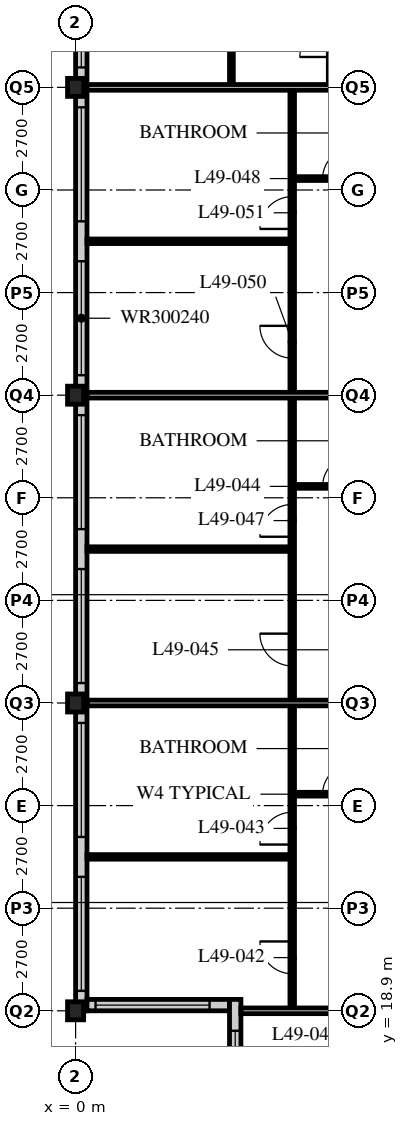
"""IFC4 building model, lengths in metres.
Left out: names, types, materials, properties, quantities, classifications, styles, units other than length and angle.
Written with IfcOpenShell. Run it as: python <this file> out.ifc"""

import sys

from ifc_helpers import new_model, si_unit, direction, frame, frame_2d, origin, origin_2d, place, context, subcontext, project, spatial, rectangle, i_section, extrude, element, fill, save


model = new_model("IFC4")
c1 = context("Model", 3, precision=1e-05, world=origin(), true_north=direction((0.0, 1.0)))
c2 = subcontext(c1, "Body", "Model", "MODEL_VIEW")
j1 = project(units=[si_unit("LENGTHUNIT", "METRE"), si_unit("PLANEANGLEUNIT", "RADIAN")], contexts=[c1])
p1 = place(None, origin())
s1 = spatial("IfcSite", under=j1, at=p1, CompositionType="ELEMENT")
p2 = place(p1, origin())
s2 = spatial("IfcBuilding", under=s1, at=p2, CompositionType="ELEMENT")
p3 = place(p2, frame((0.0, 0.0, 192.0)))
s3 = spatial("IfcBuildingStorey", under=s2, at=p3, CompositionType="ELEMENT", Elevation=192.0)
for number, where, z_axis, x_axis in (
    (1, (0.0, 18.9, 0.0), (0.0, 0.0, 1.0), (1.0, 0.0, 0.0)),
    (2, (0.0, 27.0, 0.0), (0.0, 0.0, 1.0), (1.0, 0.0, 0.0)),
    (3, (0.0, 35.1, 0.0), (0.0, 0.0, 1.0), (1.0, 0.0, 0.0)),
    (4, (0.0, 43.2, 0.0), (0.0, 0.0, 1.0), (1.0, 0.0, 0.0)),
):
    element("IfcColumn", number, at=place(p3, frame(where, z_axis=z_axis, x_axis=x_axis)), inside=s3, PredefinedType="COLUMN", context=c2, shape_type="SweptSolid", body=[
        extrude(i_section(OverallWidth=0.424, OverallDepth=0.475, WebThickness=0.048, FlangeThickness=0.077, FilletRadius=0.015, at=origin_2d()), origin(), (0.0, 0.0, 1.0), 3.6),
    ])
p4 = place(p3, frame((0.15, 51.0, 0.0), z_axis=(0.0, 0.0, 1.0), x_axis=(0.0, -1.0, 0.0)))
e5 = element("IfcWall", 5, at=p4, inside=s3, PredefinedType="SOLIDWALL", context=c2, shape_type="SweptSolid", body=[
    extrude(rectangle(XDim=32.1, YDim=0.3, at=frame_2d((16.05, 0.0))), origin(), (0.0, 0.0, 1.0), 3.39),
])
p5 = place(p4, frame((0.225, 0.0, 0.6)))
e6 = element("IfcOpeningElement", 6, at=p5, cuts=e5, PredefinedType="OPENING", context=c2, shape_type="SweptSolid", body=[
    extrude(rectangle(XDim=3.0, YDim=2.4, at=frame_2d((1.5, 1.2))), frame((0.0, 0.16, 0.0), z_axis=(0.0, -1.0, 0.0), x_axis=(1.0, 0.0, 0.0)), (0.0, 0.0, 1.0), 0.32),
])
p6 = place(p4, frame((4.275, 0.0, 0.6)))
e7 = element("IfcOpeningElement", 7, at=p6, cuts=e5, PredefinedType="OPENING", context=c2, shape_type="SweptSolid", body=[
    extrude(rectangle(XDim=3.0, YDim=2.4, at=frame_2d((1.5, 1.2))), frame((0.0, 0.16, 0.0), z_axis=(0.0, -1.0, 0.0), x_axis=(1.0, 0.0, 0.0)), (0.0, 0.0, 1.0), 0.32),
])
p7 = place(p4, frame((8.325, 0.0, 0.6)))
e8 = element("IfcOpeningElement", 8, at=p7, cuts=e5, PredefinedType="OPENING", context=c2, shape_type="SweptSolid", body=[
    extrude(rectangle(XDim=3.0, YDim=2.4, at=frame_2d((1.5, 1.2))), frame((0.0, 0.16, 0.0), z_axis=(0.0, -1.0, 0.0), x_axis=(1.0, 0.0, 0.0)), (0.0, 0.0, 1.0), 0.32),
])
p8 = place(p4, frame((12.375, 0.0, 0.6)))
e9 = element("IfcOpeningElement", 9, at=p8, cuts=e5, PredefinedType="OPENING", context=c2, shape_type="SweptSolid", body=[
    extrude(rectangle(XDim=3.0, YDim=2.4, at=frame_2d((1.5, 1.2))), frame((0.0, 0.16, 0.0), z_axis=(0.0, -1.0, 0.0), x_axis=(1.0, 0.0, 0.0)), (0.0, 0.0, 1.0), 0.32),
])
p9 = place(p4, frame((16.425, 0.0, 0.6)))
e10 = element("IfcOpeningElement", 10, at=p9, cuts=e5, PredefinedType="OPENING", context=c2, shape_type="SweptSolid", body=[
    extrude(rectangle(XDim=3.0, YDim=2.4, at=frame_2d((1.5, 1.2))), frame((0.0, 0.16, 0.0), z_axis=(0.0, -1.0, 0.0), x_axis=(1.0, 0.0, 0.0)), (0.0, 0.0, 1.0), 0.32),
])
p10 = place(p4, frame((20.475, 0.0, 0.6)))
e11 = element("IfcOpeningElement", 11, at=p10, cuts=e5, PredefinedType="OPENING", context=c2, shape_type="SweptSolid", body=[
    extrude(rectangle(XDim=3.0, YDim=2.4, at=frame_2d((1.5, 1.2))), frame((0.0, 0.16, 0.0), z_axis=(0.0, -1.0, 0.0), x_axis=(1.0, 0.0, 0.0)), (0.0, 0.0, 1.0), 0.32),
])
p11 = place(p4, frame((24.525, 0.0, 0.6)))
e12 = element("IfcOpeningElement", 12, at=p11, cuts=e5, PredefinedType="OPENING", context=c2, shape_type="SweptSolid", body=[
    extrude(rectangle(XDim=3.0, YDim=2.4, at=frame_2d((1.5, 1.2))), frame((0.0, 0.16, 0.0), z_axis=(0.0, -1.0, 0.0), x_axis=(1.0, 0.0, 0.0)), (0.0, 0.0, 1.0), 0.32),
])
p12 = place(p4, frame((28.575, 0.0, 0.6)))
e13 = element("IfcOpeningElement", 13, at=p12, cuts=e5, PredefinedType="OPENING", context=c2, shape_type="SweptSolid", body=[
    extrude(rectangle(XDim=3.0, YDim=2.4, at=frame_2d((1.5, 1.2))), frame((0.0, 0.16, 0.0), z_axis=(0.0, -1.0, 0.0), x_axis=(1.0, 0.0, 0.0)), (0.0, 0.0, 1.0), 0.32),
])
p13 = place(p3, frame((0.3, 19.05, 0.0), z_axis=(0.0, 0.0, 1.0), x_axis=(1.0, 0.0, 0.0)))
e14 = element("IfcWall", 14, at=p13, inside=s3, PredefinedType="SOLIDWALL", context=c2, shape_type="SweptSolid", body=[
    extrude(rectangle(XDim=3.75, YDim=0.3, at=frame_2d((1.875, 0.0))), origin(), (0.0, 0.0, 1.0), 3.39),
])
p14 = place(p13, frame((0.225, 0.0, 0.6)))
e15 = element("IfcOpeningElement", 15, at=p14, cuts=e14, PredefinedType="OPENING", context=c2, shape_type="SweptSolid", body=[
    extrude(rectangle(XDim=3.0, YDim=2.0, at=frame_2d((1.5, 1.0))), frame((0.0, 0.16, 0.0), z_axis=(0.0, -1.0, 0.0), x_axis=(1.0, 0.0, 0.0)), (0.0, 0.0, 1.0), 0.32),
])
p15 = place(p3, frame((4.2, 19.2, 0.0), z_axis=(0.0, 0.0, 1.0), x_axis=(0.0, -1.0, 0.0)))
e16 = element("IfcWall", 16, at=p15, inside=s3, PredefinedType="SOLIDWALL", context=c2, shape_type="SweptSolid", body=[
    extrude(rectangle(XDim=4.35, YDim=0.3, at=frame_2d((2.175, 0.0))), origin(), (0.0, 0.0, 1.0), 3.39),
])
p16 = place(p15, frame((0.825, 0.0, 0.6)))
e17 = element("IfcOpeningElement", 17, at=p16, cuts=e16, PredefinedType="OPENING", context=c2, shape_type="SweptSolid", body=[
    extrude(rectangle(XDim=3.0, YDim=2.0, at=frame_2d((1.5, 1.0))), frame((0.0, 0.16, 0.0), z_axis=(0.0, -1.0, 0.0), x_axis=(1.0, 0.0, 0.0)), (0.0, 0.0, 1.0), 0.32),
])
p17 = place(p3, frame((5.7, 18.9, 0.0), z_axis=(0.0, 0.0, 1.0), x_axis=(0.0, 1.0, 0.0)))
e18 = element("IfcWall", 18, at=p17, inside=s3, PredefinedType="PARTITIONING", context=c2, shape_type="SweptSolid", body=[
    extrude(rectangle(XDim=24.3, YDim=0.12, at=frame_2d((12.15, 0.0))), origin(), (0.0, 0.0, 1.0), 3.39),
])
p18 = place(p17, frame((0.975, 0.0, 0.0)))
e19 = element("IfcOpeningElement", 19, at=p18, cuts=e18, PredefinedType="OPENING", context=c2, shape_type="SweptSolid", body=[
    extrude(rectangle(XDim=0.85, YDim=2.1, at=frame_2d((0.425, 1.05))), frame((0.0, 0.07, 0.0), z_axis=(0.0, -1.0, 0.0), x_axis=(1.0, 0.0, 0.0)), (0.0, 0.0, 1.0), 0.14),
])
p19 = place(p17, frame((4.375, 0.0, 0.0)))
e20 = element("IfcOpeningElement", 20, at=p19, cuts=e18, PredefinedType="OPENING", context=c2, shape_type="SweptSolid", body=[
    extrude(rectangle(XDim=0.85, YDim=2.1, at=frame_2d((0.425, 1.05))), frame((0.0, 0.07, 0.0), z_axis=(0.0, -1.0, 0.0), x_axis=(1.0, 0.0, 0.0)), (0.0, 0.0, 1.0), 0.14),
])
p20 = place(p17, frame((9.075, 0.0, 0.0)))
e21 = element("IfcOpeningElement", 21, at=p20, cuts=e18, PredefinedType="OPENING", context=c2, shape_type="SweptSolid", body=[
    extrude(rectangle(XDim=0.85, YDim=2.1, at=frame_2d((0.425, 1.05))), frame((0.0, 0.07, 0.0), z_axis=(0.0, -1.0, 0.0), x_axis=(1.0, 0.0, 0.0)), (0.0, 0.0, 1.0), 0.14),
])
p21 = place(p17, frame((12.475, 0.0, 0.0)))
e22 = element("IfcOpeningElement", 22, at=p21, cuts=e18, PredefinedType="OPENING", context=c2, shape_type="SweptSolid", body=[
    extrude(rectangle(XDim=0.85, YDim=2.1, at=frame_2d((0.425, 1.05))), frame((0.0, 0.07, 0.0), z_axis=(0.0, -1.0, 0.0), x_axis=(1.0, 0.0, 0.0)), (0.0, 0.0, 1.0), 0.14),
])
p22 = place(p17, frame((17.175, 0.0, 0.0)))
e23 = element("IfcOpeningElement", 23, at=p22, cuts=e18, PredefinedType="OPENING", context=c2, shape_type="SweptSolid", body=[
    extrude(rectangle(XDim=0.85, YDim=2.1, at=frame_2d((0.425, 1.05))), frame((0.0, 0.07, 0.0), z_axis=(0.0, -1.0, 0.0), x_axis=(1.0, 0.0, 0.0)), (0.0, 0.0, 1.0), 0.14),
])
p23 = place(p17, frame((20.575, 0.0, 0.0)))
e24 = element("IfcOpeningElement", 24, at=p23, cuts=e18, PredefinedType="OPENING", context=c2, shape_type="SweptSolid", body=[
    extrude(rectangle(XDim=0.85, YDim=2.1, at=frame_2d((0.425, 1.05))), frame((0.0, 0.07, 0.0), z_axis=(0.0, -1.0, 0.0), x_axis=(1.0, 0.0, 0.0)), (0.0, 0.0, 1.0), 0.14),
])
p24 = place(p3, frame((8.1, 24.6, 0.0), z_axis=(0.0, 0.0, 1.0), x_axis=(-1.0, 0.0, 0.0)))
e25 = element("IfcWall", 25, at=p24, inside=s3, PredefinedType="PARTITIONING", context=c2, shape_type="SweptSolid", body=[
    extrude(rectangle(XDim=2.4, YDim=0.1, at=frame_2d((1.2, 0.0))), origin(), (0.0, 0.0, 1.0), 3.39),
])
p25 = place(p24, frame((0.8, 0.0, 0.0)))
e26 = element("IfcOpeningElement", 26, at=p25, cuts=e25, PredefinedType="OPENING", context=c2, shape_type="SweptSolid", body=[
    extrude(rectangle(XDim=0.8, YDim=2.1, at=frame_2d((0.4, 1.05))), frame((0.0, 0.06, 0.0), z_axis=(0.0, -1.0, 0.0), x_axis=(1.0, 0.0, 0.0)), (0.0, 0.0, 1.0), 0.12),
])
p26 = place(p3, frame((5.7, 22.95, 0.0), z_axis=(0.0, 0.0, 1.0), x_axis=(-1.0, 0.0, 0.0)))
e27 = element("IfcWall", 27, at=p26, inside=s3, PredefinedType="PARTITIONING", context=c2, shape_type="SweptSolid", body=[
    extrude(rectangle(XDim=5.4, YDim=0.12, at=frame_2d((2.7, 0.0))), origin(), (0.0, 0.0, 1.0), 3.39),
])
p27 = place(p3, frame((8.1, 27.0, 0.0), z_axis=(0.0, 0.0, 1.0), x_axis=(-1.0, 0.0, 0.0)))
e28 = element("IfcWall", 28, at=p27, inside=s3, PredefinedType="PARTITIONING", context=c2, shape_type="SweptSolid", body=[
    extrude(rectangle(XDim=7.8, YDim=0.15, at=frame_2d((3.9, 0.0))), origin(), (0.0, 0.0, 1.0), 2.778),
])
p28 = place(p3, frame((8.1, 32.7, 0.0), z_axis=(0.0, 0.0, 1.0), x_axis=(-1.0, 0.0, 0.0)))
e29 = element("IfcWall", 29, at=p28, inside=s3, PredefinedType="PARTITIONING", context=c2, shape_type="SweptSolid", body=[
    extrude(rectangle(XDim=2.4, YDim=0.1, at=frame_2d((1.2, 0.0))), origin(), (0.0, 0.0, 1.0), 3.39),
])
p29 = place(p28, frame((0.8, 0.0, 0.0)))
e30 = element("IfcOpeningElement", 30, at=p29, cuts=e29, PredefinedType="OPENING", context=c2, shape_type="SweptSolid", body=[
    extrude(rectangle(XDim=0.8, YDim=2.1, at=frame_2d((0.4, 1.05))), frame((0.0, 0.06, 0.0), z_axis=(0.0, -1.0, 0.0), x_axis=(1.0, 0.0, 0.0)), (0.0, 0.0, 1.0), 0.12),
])
p30 = place(p3, frame((5.7, 31.05, 0.0), z_axis=(0.0, 0.0, 1.0), x_axis=(-1.0, 0.0, 0.0)))
e31 = element("IfcWall", 31, at=p30, inside=s3, PredefinedType="PARTITIONING", context=c2, shape_type="SweptSolid", body=[
    extrude(rectangle(XDim=5.4, YDim=0.12, at=frame_2d((2.7, 0.0))), origin(), (0.0, 0.0, 1.0), 3.39),
])
p31 = place(p3, frame((8.1, 35.1, 0.0), z_axis=(0.0, 0.0, 1.0), x_axis=(-1.0, 0.0, 0.0)))
e32 = element("IfcWall", 32, at=p31, inside=s3, PredefinedType="PARTITIONING", context=c2, shape_type="SweptSolid", body=[
    extrude(rectangle(XDim=7.8, YDim=0.15, at=frame_2d((3.9, 0.0))), origin(), (0.0, 0.0, 1.0), 2.778),
])
p32 = place(p3, frame((8.1, 40.8, 0.0), z_axis=(0.0, 0.0, 1.0), x_axis=(-1.0, 0.0, 0.0)))
e33 = element("IfcWall", 33, at=p32, inside=s3, PredefinedType="PARTITIONING", context=c2, shape_type="SweptSolid", body=[
    extrude(rectangle(XDim=2.4, YDim=0.1, at=frame_2d((1.2, 0.0))), origin(), (0.0, 0.0, 1.0), 3.39),
])
p33 = place(p32, frame((0.8, 0.0, 0.0)))
e34 = element("IfcOpeningElement", 34, at=p33, cuts=e33, PredefinedType="OPENING", context=c2, shape_type="SweptSolid", body=[
    extrude(rectangle(XDim=0.8, YDim=2.1, at=frame_2d((0.4, 1.05))), frame((0.0, 0.06, 0.0), z_axis=(0.0, -1.0, 0.0), x_axis=(1.0, 0.0, 0.0)), (0.0, 0.0, 1.0), 0.12),
])
p34 = place(p3, frame((5.7, 39.15, 0.0), z_axis=(0.0, 0.0, 1.0), x_axis=(-1.0, 0.0, 0.0)))
e35 = element("IfcWall", 35, at=p34, inside=s3, PredefinedType="PARTITIONING", context=c2, shape_type="SweptSolid", body=[
    extrude(rectangle(XDim=5.4, YDim=0.12, at=frame_2d((2.7, 0.0))), origin(), (0.0, 0.0, 1.0), 3.39),
])
p35 = place(p3, frame((4.35, 18.9, 0.0), z_axis=(0.0, 0.0, 1.0), x_axis=(1.0, 0.0, 0.0)))
e36 = element("IfcWall", 36, at=p35, inside=s3, PredefinedType="PARTITIONING", context=c2, shape_type="SweptSolid", body=[
    extrude(rectangle(XDim=3.75, YDim=0.15, at=frame_2d((1.875, 0.0))), origin(), (0.0, 0.0, 1.0), 2.778),
])
p36 = place(p3, frame((4.1, 43.2, 0.0), z_axis=(0.0, 0.0, 1.0), x_axis=(0.0, 1.0, 0.0)))
e37 = element("IfcWall", 37, at=p36, inside=s3, PredefinedType="PARTITIONING", context=c2, shape_type="SweptSolid", body=[
    extrude(rectangle(XDim=2.4, YDim=0.1, at=frame_2d((1.2, 0.0))), origin(), (0.0, 0.0, 1.0), 3.39),
])
p37 = place(p3, frame((0.3, 43.2, 0.0), z_axis=(0.0, 0.0, 1.0), x_axis=(1.0, 0.0, 0.0)))
e38 = element("IfcWall", 38, at=p37, inside=s3, PredefinedType="PARTITIONING", context=c2, shape_type="SweptSolid", body=[
    extrude(rectangle(XDim=7.8, YDim=0.15, at=frame_2d((3.9, 0.0))), origin(), (0.0, 0.0, 1.0), 2.778),
])
p38 = place(p6, origin())
e39 = element("IfcWindow", 39, at=p38, inside=s3, PartitioningType="SINGLE_PANEL", PredefinedType="WINDOW", context=c2, shape_type="SweptSolid", body=[
    extrude(rectangle(XDim=3.0, YDim=2.4, at=frame_2d((1.5, 1.2))), frame((0.0, 0.03, 0.0), z_axis=(0.0, -1.0, 0.0), x_axis=(1.0, 0.0, 0.0)), (0.0, 0.0, 1.0), 0.06),
])
fill(e7, e39)
p39 = place(p7, origin())
e40 = element("IfcWindow", 40, at=p39, inside=s3, PartitioningType="SINGLE_PANEL", PredefinedType="WINDOW", context=c2, shape_type="SweptSolid", body=[
    extrude(rectangle(XDim=3.0, YDim=2.4, at=frame_2d((1.5, 1.2))), frame((0.0, 0.03, 0.0), z_axis=(0.0, -1.0, 0.0), x_axis=(1.0, 0.0, 0.0)), (0.0, 0.0, 1.0), 0.06),
])
fill(e8, e40)
p40 = place(p8, origin())
e41 = element("IfcWindow", 41, at=p40, inside=s3, PartitioningType="SINGLE_PANEL", PredefinedType="WINDOW", context=c2, shape_type="SweptSolid", body=[
    extrude(rectangle(XDim=3.0, YDim=2.4, at=frame_2d((1.5, 1.2))), frame((0.0, 0.03, 0.0), z_axis=(0.0, -1.0, 0.0), x_axis=(1.0, 0.0, 0.0)), (0.0, 0.0, 1.0), 0.06),
])
fill(e9, e41)
p41 = place(p9, origin())
e42 = element("IfcWindow", 42, at=p41, inside=s3, PartitioningType="SINGLE_PANEL", PredefinedType="WINDOW", context=c2, shape_type="SweptSolid", body=[
    extrude(rectangle(XDim=3.0, YDim=2.4, at=frame_2d((1.5, 1.2))), frame((0.0, 0.03, 0.0), z_axis=(0.0, -1.0, 0.0), x_axis=(1.0, 0.0, 0.0)), (0.0, 0.0, 1.0), 0.06),
])
fill(e10, e42)
p42 = place(p10, origin())
e43 = element("IfcWindow", 43, at=p42, inside=s3, PartitioningType="SINGLE_PANEL", PredefinedType="WINDOW", context=c2, shape_type="SweptSolid", body=[
    extrude(rectangle(XDim=3.0, YDim=2.4, at=frame_2d((1.5, 1.2))), frame((0.0, 0.03, 0.0), z_axis=(0.0, -1.0, 0.0), x_axis=(1.0, 0.0, 0.0)), (0.0, 0.0, 1.0), 0.06),
])
fill(e11, e43)
p43 = place(p11, origin())
e44 = element("IfcWindow", 44, at=p43, inside=s3, PartitioningType="SINGLE_PANEL", PredefinedType="WINDOW", context=c2, shape_type="SweptSolid", body=[
    extrude(rectangle(XDim=3.0, YDim=2.4, at=frame_2d((1.5, 1.2))), frame((0.0, 0.03, 0.0), z_axis=(0.0, -1.0, 0.0), x_axis=(1.0, 0.0, 0.0)), (0.0, 0.0, 1.0), 0.06),
])
fill(e12, e44)
p44 = place(p12, origin())
e45 = element("IfcWindow", 45, at=p44, inside=s3, PartitioningType="SINGLE_PANEL", PredefinedType="WINDOW", context=c2, shape_type="SweptSolid", body=[
    extrude(rectangle(XDim=3.0, YDim=2.4, at=frame_2d((1.5, 1.2))), frame((0.0, 0.03, 0.0), z_axis=(0.0, -1.0, 0.0), x_axis=(1.0, 0.0, 0.0)), (0.0, 0.0, 1.0), 0.06),
])
fill(e13, e45)
p45 = place(p14, origin())
e46 = element("IfcWindow", 46, at=p45, inside=s3, PartitioningType="SINGLE_PANEL", PredefinedType="WINDOW", context=c2, shape_type="SweptSolid", body=[
    extrude(rectangle(XDim=3.0, YDim=2.0, at=frame_2d((1.5, 1.0))), frame((0.0, 0.03, 0.0), z_axis=(0.0, -1.0, 0.0), x_axis=(1.0, 0.0, 0.0)), (0.0, 0.0, 1.0), 0.06),
])
fill(e15, e46)
p46 = place(p16, origin())
e47 = element("IfcWindow", 47, at=p46, inside=s3, PartitioningType="SINGLE_PANEL", PredefinedType="WINDOW", context=c2, shape_type="SweptSolid", body=[
    extrude(rectangle(XDim=3.0, YDim=2.0, at=frame_2d((1.5, 1.0))), frame((0.0, 0.03, 0.0), z_axis=(0.0, -1.0, 0.0), x_axis=(1.0, 0.0, 0.0)), (0.0, 0.0, 1.0), 0.06),
])
fill(e17, e47)
p47 = place(p25, origin())
e48 = element("IfcDoor", 48, at=p47, inside=s3, OperationType="SINGLE_SWING_RIGHT", PredefinedType="DOOR", context=c2, shape_type="SweptSolid", body=[
    extrude(rectangle(XDim=0.8, YDim=2.1, at=frame_2d((0.4, 1.05))), frame((0.0, 0.025, 0.0), z_axis=(0.0, -1.0, 0.0), x_axis=(1.0, 0.0, 0.0)), (0.0, 0.0, 1.0), 0.05),
])
fill(e26, e48)
p48 = place(p18, origin())
e49 = element("IfcDoor", 49, at=p48, inside=s3, OperationType="SINGLE_SWING_RIGHT", PredefinedType="DOOR", context=c2, shape_type="SweptSolid", body=[
    extrude(rectangle(XDim=0.85, YDim=2.1, at=frame_2d((0.425, 1.05))), frame((0.0, 0.025, 0.0), z_axis=(0.0, -1.0, 0.0), x_axis=(1.0, 0.0, 0.0)), (0.0, 0.0, 1.0), 0.05),
])
fill(e19, e49)
p49 = place(p19, origin())
e50 = element("IfcDoor", 50, at=p49, inside=s3, OperationType="SINGLE_SWING_LEFT", PredefinedType="DOOR", context=c2, shape_type="SweptSolid", body=[
    extrude(rectangle(XDim=0.85, YDim=2.1, at=frame_2d((0.425, 1.05))), frame((0.0, 0.025, 0.0), z_axis=(0.0, -1.0, 0.0), x_axis=(1.0, 0.0, 0.0)), (0.0, 0.0, 1.0), 0.05),
])
fill(e20, e50)
p50 = place(p29, origin())
e51 = element("IfcDoor", 51, at=p50, inside=s3, OperationType="SINGLE_SWING_RIGHT", PredefinedType="DOOR", context=c2, shape_type="SweptSolid", body=[
    extrude(rectangle(XDim=0.8, YDim=2.1, at=frame_2d((0.4, 1.05))), frame((0.0, 0.025, 0.0), z_axis=(0.0, -1.0, 0.0), x_axis=(1.0, 0.0, 0.0)), (0.0, 0.0, 1.0), 0.05),
])
fill(e30, e51)
p51 = place(p20, origin())
e52 = element("IfcDoor", 52, at=p51, inside=s3, OperationType="SINGLE_SWING_RIGHT", PredefinedType="DOOR", context=c2, shape_type="SweptSolid", body=[
    extrude(rectangle(XDim=0.85, YDim=2.1, at=frame_2d((0.425, 1.05))), frame((0.0, 0.025, 0.0), z_axis=(0.0, -1.0, 0.0), x_axis=(1.0, 0.0, 0.0)), (0.0, 0.0, 1.0), 0.05),
])
fill(e21, e52)
p52 = place(p21, origin())
e53 = element("IfcDoor", 53, at=p52, inside=s3, OperationType="SINGLE_SWING_LEFT", PredefinedType="DOOR", context=c2, shape_type="SweptSolid", body=[
    extrude(rectangle(XDim=0.85, YDim=2.1, at=frame_2d((0.425, 1.05))), frame((0.0, 0.025, 0.0), z_axis=(0.0, -1.0, 0.0), x_axis=(1.0, 0.0, 0.0)), (0.0, 0.0, 1.0), 0.05),
])
fill(e22, e53)
p53 = place(p33, origin())
e54 = element("IfcDoor", 54, at=p53, inside=s3, OperationType="SINGLE_SWING_RIGHT", PredefinedType="DOOR", context=c2, shape_type="SweptSolid", body=[
    extrude(rectangle(XDim=0.8, YDim=2.1, at=frame_2d((0.4, 1.05))), frame((0.0, 0.025, 0.0), z_axis=(0.0, -1.0, 0.0), x_axis=(1.0, 0.0, 0.0)), (0.0, 0.0, 1.0), 0.05),
])
fill(e34, e54)
p54 = place(p22, origin())
e55 = element("IfcDoor", 55, at=p54, inside=s3, OperationType="SINGLE_SWING_RIGHT", PredefinedType="DOOR", context=c2, shape_type="SweptSolid", body=[
    extrude(rectangle(XDim=0.85, YDim=2.1, at=frame_2d((0.425, 1.05))), frame((0.0, 0.025, 0.0), z_axis=(0.0, -1.0, 0.0), x_axis=(1.0, 0.0, 0.0)), (0.0, 0.0, 1.0), 0.05),
])
fill(e23, e55)
p55 = place(p23, origin())
e56 = element("IfcDoor", 56, at=p55, inside=s3, OperationType="SINGLE_SWING_LEFT", PredefinedType="DOOR", context=c2, shape_type="SweptSolid", body=[
    extrude(rectangle(XDim=0.85, YDim=2.1, at=frame_2d((0.425, 1.05))), frame((0.0, 0.025, 0.0), z_axis=(0.0, -1.0, 0.0), x_axis=(1.0, 0.0, 0.0)), (0.0, 0.0, 1.0), 0.05),
])
fill(e24, e56)
save(model, sys.argv[1])
